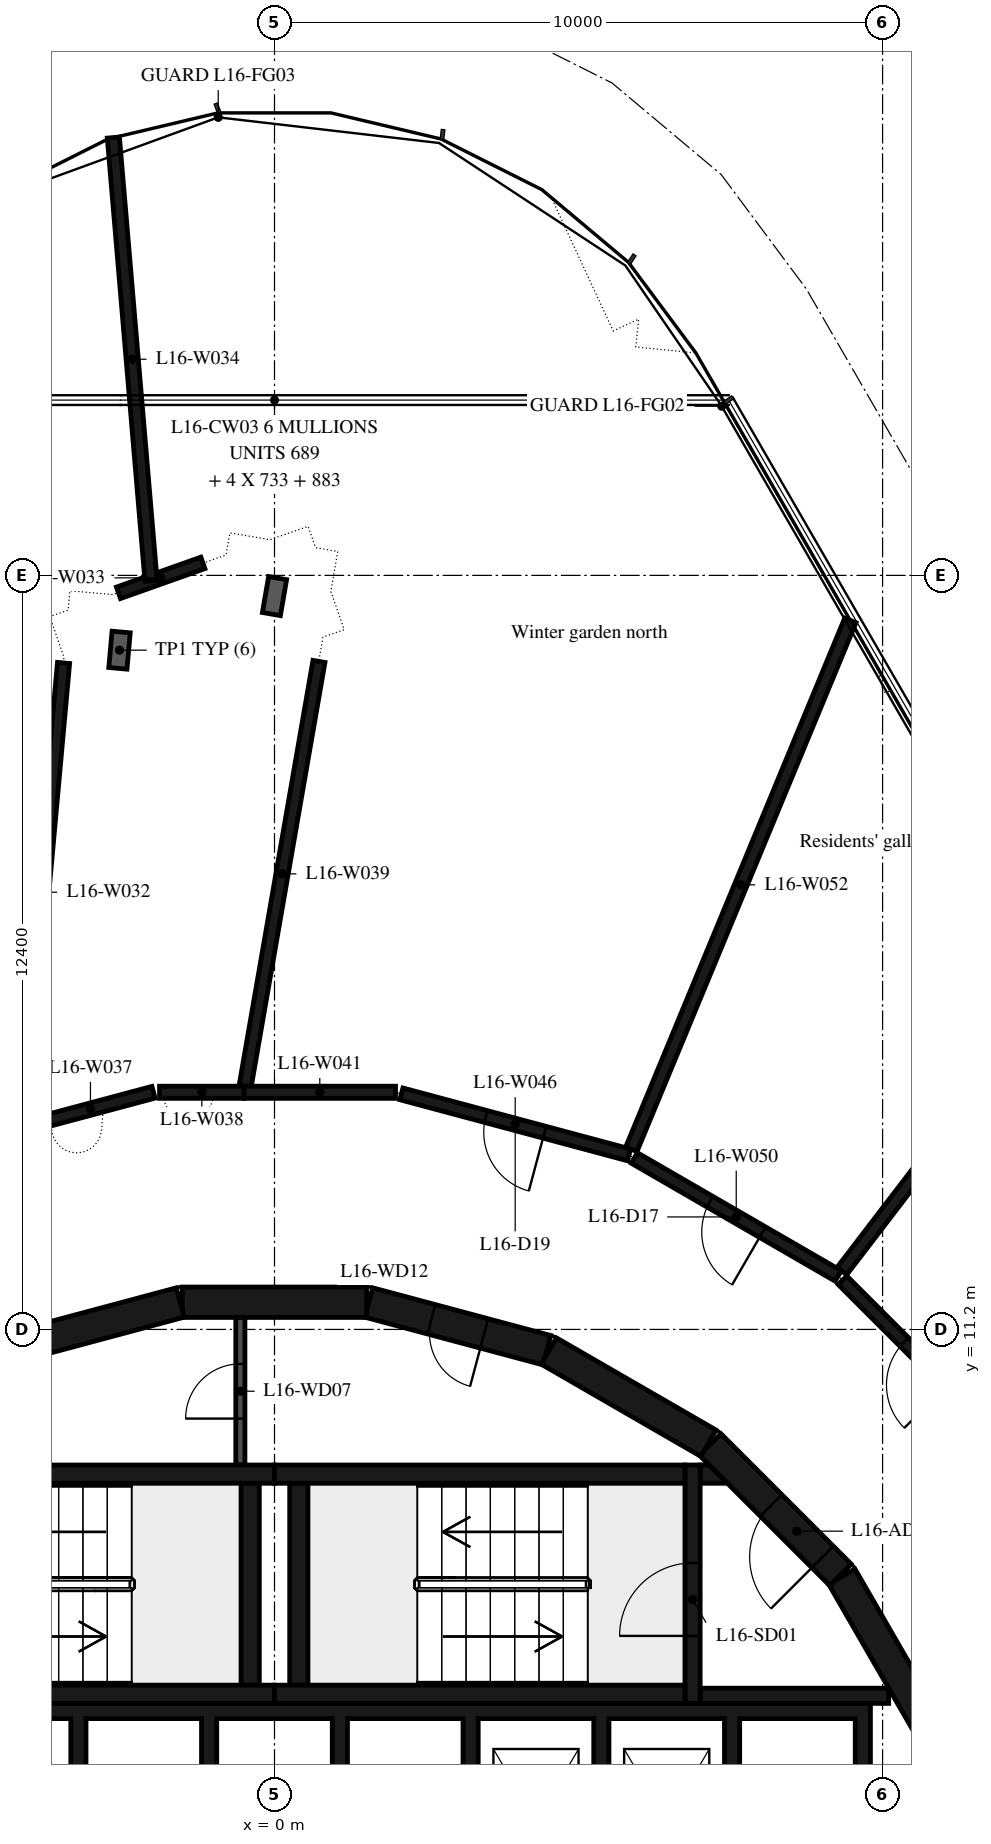
"""IFC4 building model, lengths in metres.
Left out: names, types, materials, properties, quantities, classifications, styles, units other than length and angle.
Written with IfcOpenShell. Run it as: python <this file> out.ifc"""

import sys

from ifc_helpers import new_model, si_unit, direction, frame, frame_2d, origin, place, context, subcontext, project, spatial, polyline, rectangle, outline, extrude, element, fill, save


model = new_model("IFC4")
c1 = context("Model", 3, precision=1e-05, world=origin(), true_north=direction((0.0, 1.0)))
c2 = subcontext(c1, "Body", "Model", "MODEL_VIEW")
j1 = project(units=[si_unit("LENGTHUNIT", "METRE"), si_unit("PLANEANGLEUNIT", "RADIAN")], contexts=[c1])
p1 = place(None, origin())
s1 = spatial("IfcSite", under=j1, at=p1, CompositionType="ELEMENT")
p2 = place(p1, origin())
s2 = spatial("IfcBuilding", under=s1, at=p2, CompositionType="ELEMENT")
p3 = place(p2, frame((0.0, 0.0, 69.9)))
s3 = spatial("IfcBuildingStorey", under=s2, at=p3, CompositionType="ELEMENT", Elevation=69.9)
p4 = place(p3, frame((10.845, 4.51, 0.0), z_axis=(0.0, 0.0, 1.0), x_axis=(-0.500087131594, 0.865975092491, 0.0)))
e1 = element("IfcWall", 1, at=p4, inside=s3, PredefinedType="SHEAR", context=c2, shape_type="SweptSolid", body=[
    extrude(rectangle(XDim=3.033, YDim=0.5, at=frame_2d((1.516, 0.0))), origin(), (0.0, 0.0, 1.0), 6.35),
])
p5 = place(p3, frame((9.308, 7.164, 0.0), z_axis=(0.0, 0.0, 1.0), x_axis=(-0.707106781187, 0.707106781187, 0.0)))
e2 = element("IfcWall", 2, at=p5, inside=s3, PredefinedType="SHEAR", context=c2, shape_type="SweptSolid", body=[
    extrude(rectangle(XDim=3.032, YDim=0.5, at=frame_2d((1.516, 0.0))), origin(), (0.0, 0.0, 1.0), 6.35),
])
p6 = place(p5, frame((0.416, 0.0, 0.0)))
e3 = element("IfcOpeningElement", 3, at=p6, cuts=e2, PredefinedType="OPENING", context=c2, shape_type="SweptSolid", body=[
    extrude(rectangle(XDim=1.2, YDim=2.1, at=frame_2d((0.6, 1.05))), frame((0.0, 0.26, 0.0), z_axis=(0.0, -1.0, 0.0), x_axis=(1.0, 0.0, 0.0)), (0.0, 0.0, 1.0), 0.52),
])
p7 = place(p3, frame((7.137, 9.329, 0.0), z_axis=(0.0, 0.0, 1.0), x_axis=(-0.865975092491, 0.500087131594, 0.0)))
e4 = element("IfcWall", 4, at=p7, inside=s3, PredefinedType="SHEAR", context=c2, shape_type="SweptSolid", body=[
    extrude(rectangle(XDim=3.033, YDim=0.5, at=frame_2d((1.516, 0.0))), origin(), (0.0, 0.0, 1.0), 6.35),
])
p8 = place(p3, frame((4.479, 10.858, 0.0), z_axis=(0.0, 0.0, 1.0), x_axis=(-0.965948410781, 0.258734743916, 0.0)))
e5 = element("IfcWall", 5, at=p8, inside=s3, PredefinedType="SHEAR", context=c2, shape_type="SweptSolid", body=[
    extrude(rectangle(XDim=3.033, YDim=0.5, at=frame_2d((1.516, 0.0))), origin(), (0.0, 0.0, 1.0), 6.35),
])
p9 = place(p8, frame((1.066, 0.0, 0.0)))
e6 = element("IfcOpeningElement", 6, at=p9, cuts=e5, PredefinedType="OPENING", context=c2, shape_type="SweptSolid", body=[
    extrude(rectangle(XDim=0.9, YDim=2.1, at=frame_2d((0.45, 1.05))), frame((0.0, 0.26, 0.0), z_axis=(0.0, -1.0, 0.0), x_axis=(1.0, 0.0, 0.0)), (0.0, 0.0, 1.0), 0.52),
])
for number, where, z_axis, x_axis in (
    (7, (1.516, 11.647, 0.0), (0.0, 0.0, 1.0), (-1.0, 0.0, 0.0)),
    (8, (-1.55, 11.643, 0.0), (0.0, 0.0, 1.0), (-0.966, -0.259, 0.0)),
):
    element("IfcWall", number, at=place(p3, frame(where, z_axis=z_axis, x_axis=x_axis)), inside=s3, PredefinedType="SHEAR", context=c2, shape_type="SweptSolid", body=[
        extrude(rectangle(XDim=3.033, YDim=0.5, at=frame_2d((1.516, 0.0))), origin(), (0.0, 0.0, 1.0), 6.35),
    ])
for number, where, z_axis, x_axis in (
    (9, (0.0, 5.2, 0.0), (0.0, 0.0, 1.0), (1.0, 0.0, 0.0)),
    (10, (0.0, 8.82, 0.0), (0.0, 0.0, 1.0), (1.0, 0.0, 0.0)),
):
    element("IfcWall", number, at=place(p3, frame(where, z_axis=z_axis, x_axis=x_axis)), inside=s3, PredefinedType="SHEAR", context=c2, shape_type="SweptSolid", body=[
        extrude(rectangle(XDim=6.75, YDim=0.3, at=frame_2d((3.375, 0.0))), origin(), (0.0, 0.0, 1.0), 6.35),
    ])
p10 = place(p3, frame((0.4, 5.35, 0.0), z_axis=(0.0, 0.0, 1.0), x_axis=(0.0, 1.0, 0.0)))
e11 = element("IfcWall", 11, at=p10, inside=s3, PredefinedType="SHEAR", context=c2, shape_type="SweptSolid", body=[
    extrude(rectangle(XDim=3.32, YDim=0.3, at=frame_2d((1.66, 0.0))), origin(), (0.0, 0.0, 1.0), 6.35),
])
p11 = place(p3, frame((6.875, 5.05, 0.0), z_axis=(0.0, 0.0, 1.0), x_axis=(0.0, 1.0, 0.0)))
e12 = element("IfcWall", 12, at=p11, inside=s3, PredefinedType="SHEAR", context=c2, shape_type="SweptSolid", body=[
    extrude(rectangle(XDim=3.92, YDim=0.25, at=frame_2d((1.96, 0.0))), origin(), (0.0, 0.0, 1.0), 6.35),
])
p12 = place(p11, frame((1.11, 0.0, 0.0)))
e13 = element("IfcOpeningElement", 13, at=p12, cuts=e12, PredefinedType="OPENING", context=c2, shape_type="SweptSolid", body=[
    extrude(rectangle(XDim=1.2, YDim=2.1, at=frame_2d((0.6, 1.05))), frame((0.0, 0.135, 0.0), z_axis=(0.0, -1.0, 0.0), x_axis=(1.0, 0.0, 0.0)), (0.0, 0.0, 1.0), 0.27),
])
p13 = place(p3, frame((7.0, 5.175, 0.0), z_axis=(0.0, 0.0, 1.0), x_axis=(1.0, 0.0, 0.0)))
e14 = element("IfcWall", 14, at=p13, inside=s3, PredefinedType="SHEAR", context=c2, shape_type="SweptSolid", body=[
    extrude(rectangle(XDim=3.1, YDim=0.25, at=frame_2d((1.55, 0.0))), origin(), (0.0, 0.0, 1.0), 6.35),
])
p14 = place(p3, origin())
e15 = element("IfcWall", 15, at=p14, inside=s3, PredefinedType="SHEAR", context=c2, shape_type="SweptSolid", body=[
    extrude(outline(polyline([(7.448, 8.67), (7.0, 8.67), (7.0, 8.97), (7.148, 8.97), (7.448, 8.67)])), origin(), (0.0, 0.0, 1.0), 6.35),
])
for number, where, z_axis, x_axis in (
    (16, (-6.75, 5.2, 0.0), (0.0, 0.0, 1.0), (1.0, 0.0, 0.0)),
    (17, (-6.75, 8.82, 0.0), (0.0, 0.0, 1.0), (1.0, 0.0, 0.0)),
):
    element("IfcWall", number, at=place(p3, frame(where, z_axis=z_axis, x_axis=x_axis)), inside=s3, PredefinedType="SHEAR", context=c2, shape_type="SweptSolid", body=[
        extrude(rectangle(XDim=6.75, YDim=0.3, at=frame_2d((3.375, 0.0))), origin(), (0.0, 0.0, 1.0), 6.35),
    ])
p15 = place(p3, frame((-0.4, 5.35, 0.0), z_axis=(0.0, 0.0, 1.0), x_axis=(0.0, 1.0, 0.0)))
e18 = element("IfcWall", 18, at=p15, inside=s3, PredefinedType="SHEAR", context=c2, shape_type="SweptSolid", body=[
    extrude(rectangle(XDim=3.32, YDim=0.3, at=frame_2d((1.66, 0.0))), origin(), (0.0, 0.0, 1.0), 6.35),
])
p16 = place(p3, origin())
e19 = element("IfcWall", 19, at=p16, inside=s3, PredefinedType="SHEAR", context=c2, shape_type="SweptSolid", body=[
    extrude(outline(polyline([(-9.55, 4.8), (-7.65, 4.8), (-7.65, 1.9), (-7.4, 1.9), (-7.4, 4.8), (-5.5, 4.8), (-5.5, 1.9), (-5.25, 1.9), (-5.25, 4.8), (-3.35, 4.8), (-3.35, 1.9), (-3.1, 1.9), (-3.1, 4.8), (-1.2, 4.8), (-1.2, 1.9), (-0.95, 1.9), (-0.95, 4.8), (0.95, 4.8), (0.95, 1.9), (1.2, 1.9), (1.2, 4.8), (3.1, 4.8), (3.1, 1.9), (3.35, 1.9), (3.35, 4.8), (5.25, 4.8), (5.25, 1.9), (5.5, 1.9), (5.5, 4.8), (7.4, 4.8), (7.4, 1.9), (7.65, 1.9), (7.65, 4.8), (9.55, 4.8), (9.55, 1.9), (9.8, 1.9), (9.8, 4.8), (9.8, 5.05), (-9.8, 5.05), (-9.8, 4.8), (-9.8, 1.9), (-9.55, 1.9), (-9.55, 4.8)])), origin(), (0.0, 0.0, 1.0), 6.35),
])
p17 = place(p3, frame((-0.562, 8.97, 0.0), z_axis=(0.0, 0.0, 1.0), x_axis=(0.0, 1.0, 0.0)))
e20 = element("IfcWall", 20, at=p17, inside=s3, PredefinedType="PARTITIONING", context=c2, shape_type="SweptSolid", body=[
    extrude(rectangle(XDim=2.427, YDim=0.15, at=frame_2d((1.214, 0.0))), origin(), (0.0, 0.0, 1.0), 6.35),
])
p18 = place(p17, frame((0.764, 0.0, 0.0)))
e21 = element("IfcOpeningElement", 21, at=p18, cuts=e20, PredefinedType="OPENING", context=c2, shape_type="SweptSolid", body=[
    extrude(rectangle(XDim=0.9, YDim=2.1, at=frame_2d((0.45, 1.05))), frame((0.0, 0.085, 0.0), z_axis=(0.0, -1.0, 0.0), x_axis=(1.0, 0.0, 0.0)), (0.0, 0.0, 1.0), 0.17),
])
p19 = place(p3, frame((-3.469, 22.16, 0.0), z_axis=(0.0, 0.0, 1.0), x_axis=(-0.090058939674, -0.995936437422, 0.0)))
e22 = element("IfcWall", 22, at=p19, inside=s3, PredefinedType="PARTITIONING", context=c2, shape_type="SweptSolid", body=[
    extrude(rectangle(XDim=7.572, YDim=0.2, at=frame_2d((3.786, 0.0))), origin(), (0.0, 0.0, 1.0), 6.35),
])
p20 = place(p3, frame((-2.566, 23.313, 0.0), z_axis=(0.0, 0.0, 1.0), x_axis=(0.942422688544, 0.334424096199, 0.0)))
e23 = element("IfcWall", 23, at=p20, inside=s3, PredefinedType="PARTITIONING", context=c2, shape_type="SweptSolid", body=[
    extrude(rectangle(XDim=1.472, YDim=0.2, at=frame_2d((0.736, 0.0))), origin(), (0.0, 0.0, 1.0), 6.35),
])
p21 = place(p3, frame((-2.03, 23.51, 0.0), z_axis=(0.0, 0.0, 1.0), x_axis=(-0.084724408258, 0.996404423236, 0.0)))
e24 = element("IfcWall", 24, at=p21, inside=s3, PredefinedType="PARTITIONING", context=c2, shape_type="SweptSolid", body=[
    extrude(rectangle(XDim=7.316, YDim=0.2, at=frame_2d((3.658, 0.0))), origin(), (0.0, 0.0, 1.0), 6.35),
])
p22 = place(p3, frame((-1.99, 15.1, 0.0), z_axis=(0.0, 0.0, 1.0), x_axis=(-0.966087519043, -0.258214843781, 0.0)))
e25 = element("IfcWall", 25, at=p22, inside=s3, PredefinedType="PARTITIONING", context=c2, shape_type="SweptSolid", body=[
    extrude(rectangle(XDim=2.146, YDim=0.2, at=frame_2d((1.073, 0.0))), origin(), (0.0, 0.0, 1.0), 6.35),
])
p23 = place(p3, frame((-0.5, 15.1, 0.0), z_axis=(0.0, 0.0, 1.0), x_axis=(-1.0, 0.0, 0.0)))
e26 = element("IfcWall", 26, at=p23, inside=s3, PredefinedType="PARTITIONING", context=c2, shape_type="SweptSolid", body=[
    extrude(rectangle(XDim=1.39, YDim=0.2, at=frame_2d((0.695, 0.0))), origin(), (0.0, 0.0, 1.0), 6.35),
])
p24 = place(p3, frame((-0.483, 15.198, 0.0), z_axis=(0.0, 0.0, 1.0), x_axis=(0.171227856746, 0.985231455585, 0.0)))
e27 = element("IfcWall", 27, at=p24, inside=s3, PredefinedType="PARTITIONING", context=c2, shape_type="SweptSolid", body=[
    extrude(rectangle(XDim=7.092, YDim=0.2, at=frame_2d((3.546, 0.0))), origin(), (0.0, 0.0, 1.0), 6.35),
])
p25 = place(p3, frame((1.99, 15.1, 0.0), z_axis=(0.0, 0.0, 1.0), x_axis=(-1.0, 0.0, 0.0)))
e28 = element("IfcWall", 28, at=p25, inside=s3, PredefinedType="PARTITIONING", context=c2, shape_type="SweptSolid", body=[
    extrude(rectangle(XDim=2.49, YDim=0.2, at=frame_2d((1.245, 0.0))), origin(), (0.0, 0.0, 1.0), 6.35),
])
p26 = place(p3, frame((5.83, 14.07, 0.0), z_axis=(0.0, 0.0, 1.0), x_axis=(-0.965870133458, 0.259026804199, 0.0)))
e29 = element("IfcWall", 29, at=p26, inside=s3, PredefinedType="PARTITIONING", context=c2, shape_type="SweptSolid", body=[
    extrude(rectangle(XDim=3.876, YDim=0.2, at=frame_2d((1.938, 0.0))), origin(), (0.0, 0.0, 1.0), 6.35),
])
p27 = place(p26, frame((1.438, 0.0, 0.0)))
e30 = element("IfcOpeningElement", 30, at=p27, cuts=e29, PredefinedType="OPENING", context=c2, shape_type="SweptSolid", body=[
    extrude(rectangle(XDim=1.0, YDim=2.1, at=frame_2d((0.5, 1.05))), frame((0.0, 0.11, 0.0), z_axis=(0.0, -1.0, 0.0), x_axis=(1.0, 0.0, 0.0)), (0.0, 0.0, 1.0), 0.22),
])
p28 = place(p3, frame((9.27, 12.08, 0.0), z_axis=(0.0, 0.0, 1.0), x_axis=(-0.865601686425, 0.500733182901, 0.0)))
e31 = element("IfcWall", 31, at=p28, inside=s3, PredefinedType="PARTITIONING", context=c2, shape_type="SweptSolid", body=[
    extrude(rectangle(XDim=3.874, YDim=0.2, at=frame_2d((1.937, 0.0))), origin(), (0.0, 0.0, 1.0), 6.35),
])
p29 = place(p28, frame((1.437, 0.0, 0.0)))
e32 = element("IfcOpeningElement", 32, at=p29, cuts=e31, PredefinedType="OPENING", context=c2, shape_type="SweptSolid", body=[
    extrude(rectangle(XDim=1.0, YDim=2.1, at=frame_2d((0.5, 1.05))), frame((0.0, 0.11, 0.0), z_axis=(0.0, -1.0, 0.0), x_axis=(1.0, 0.0, 0.0)), (0.0, 0.0, 1.0), 0.22),
])
p30 = place(p3, frame((9.331, 12.159, 0.0), z_axis=(0.0, 0.0, 1.0), x_axis=(0.607927563865, 0.793992491837, 0.0)))
e33 = element("IfcWall", 33, at=p30, inside=s3, PredefinedType="PARTITIONING", context=c2, shape_type="SweptSolid", body=[
    extrude(rectangle(XDim=5.92, YDim=0.2, at=frame_2d((2.96, 0.0))), origin(), (0.0, 0.0, 1.0), 6.35),
])
p31 = place(p3, frame((9.47, 22.86, 0.0), z_axis=(0.0, 0.0, 1.0), x_axis=(-0.382599926304, -0.923914117433, 0.0)))
e34 = element("IfcWall", 34, at=p31, inside=s3, PredefinedType="PARTITIONING", context=c2, shape_type="SweptSolid", body=[
    extrude(rectangle(XDim=9.414, YDim=0.2, at=frame_2d((4.707, 0.0))), origin(), (0.0, 0.0, 1.0), 6.35),
])
p32 = place(p3, frame((12.08, 9.27, 0.0), z_axis=(0.0, 0.0, 1.0), x_axis=(-0.707106781187, 0.707106781187, 0.0)))
e35 = element("IfcWall", 35, at=p32, inside=s3, PredefinedType="PARTITIONING", context=c2, shape_type="SweptSolid", body=[
    extrude(rectangle(XDim=3.874, YDim=0.2, at=frame_2d((1.937, 0.0))), origin(), (0.0, 0.0, 1.0), 6.35),
])
p33 = place(p32, frame((1.437, 0.0, 0.0)))
e36 = element("IfcOpeningElement", 36, at=p33, cuts=e35, PredefinedType="OPENING", context=c2, shape_type="SweptSolid", body=[
    extrude(rectangle(XDim=1.0, YDim=2.1, at=frame_2d((0.5, 1.05))), frame((0.0, 0.11, 0.0), z_axis=(0.0, -1.0, 0.0), x_axis=(1.0, 0.0, 0.0)), (0.0, 0.0, 1.0), 0.22),
])
p34 = place(p12, origin())
e37 = element("IfcDoor", 37, at=p34, inside=s3, OperationType="SINGLE_SWING_LEFT", PredefinedType="DOOR", context=c2, shape_type="SweptSolid", body=[
    extrude(rectangle(XDim=1.2, YDim=2.1, at=frame_2d((0.6, 1.05))), frame((0.0, 0.025, 0.0), z_axis=(0.0, -1.0, 0.0), x_axis=(1.0, 0.0, 0.0)), (0.0, 0.0, 1.0), 0.05),
])
fill(e13, e37)
p35 = place(p6, origin())
e38 = element("IfcDoor", 38, at=p35, inside=s3, OperationType="SINGLE_SWING_RIGHT", PredefinedType="DOOR", context=c2, shape_type="SweptSolid", body=[
    extrude(rectangle(XDim=1.2, YDim=2.1, at=frame_2d((0.6, 1.05))), frame((0.0, 0.025, 0.0), z_axis=(0.0, -1.0, 0.0), x_axis=(1.0, 0.0, 0.0)), (0.0, 0.0, 1.0), 0.05),
])
fill(e3, e38)
p36 = place(p18, origin())
e39 = element("IfcDoor", 39, at=p36, inside=s3, OperationType="SINGLE_SWING_RIGHT", PredefinedType="DOOR", context=c2, shape_type="SweptSolid", body=[
    extrude(rectangle(XDim=0.9, YDim=2.1, at=frame_2d((0.45, 1.05))), frame((0.0, 0.025, 0.0), z_axis=(0.0, -1.0, 0.0), x_axis=(1.0, 0.0, 0.0)), (0.0, 0.0, 1.0), 0.05),
])
fill(e21, e39)
p37 = place(p9, origin())
e40 = element("IfcDoor", 40, at=p37, inside=s3, OperationType="SINGLE_SWING_LEFT", PredefinedType="DOOR", context=c2, shape_type="SweptSolid", body=[
    extrude(rectangle(XDim=0.9, YDim=2.1, at=frame_2d((0.45, 1.05))), frame((0.0, 0.025, 0.0), z_axis=(0.0, -1.0, 0.0), x_axis=(1.0, 0.0, 0.0)), (0.0, 0.0, 1.0), 0.05),
])
fill(e6, e40)
p38 = place(p33, origin())
e41 = element("IfcDoor", 41, at=p38, inside=s3, OperationType="SINGLE_SWING_LEFT", PredefinedType="DOOR", context=c2, shape_type="SweptSolid", body=[
    extrude(rectangle(XDim=1.0, YDim=2.1, at=frame_2d((0.5, 1.05))), frame((0.0, 0.025, 0.0), z_axis=(0.0, -1.0, 0.0), x_axis=(1.0, 0.0, 0.0)), (0.0, 0.0, 1.0), 0.05),
])
fill(e36, e41)
p39 = place(p29, origin())
e42 = element("IfcDoor", 42, at=p39, inside=s3, OperationType="SINGLE_SWING_LEFT", PredefinedType="DOOR", context=c2, shape_type="SweptSolid", body=[
    extrude(rectangle(XDim=1.0, YDim=2.1, at=frame_2d((0.5, 1.05))), frame((0.0, 0.025, 0.0), z_axis=(0.0, -1.0, 0.0), x_axis=(1.0, 0.0, 0.0)), (0.0, 0.0, 1.0), 0.05),
])
fill(e32, e42)
p40 = place(p27, origin())
e43 = element("IfcDoor", 43, at=p40, inside=s3, OperationType="SINGLE_SWING_LEFT", PredefinedType="DOOR", context=c2, shape_type="SweptSolid", body=[
    extrude(rectangle(XDim=1.0, YDim=2.1, at=frame_2d((0.5, 1.05))), frame((0.0, 0.025, 0.0), z_axis=(0.0, -1.0, 0.0), x_axis=(1.0, 0.0, 0.0)), (0.0, 0.0, 1.0), 0.05),
])
fill(e30, e43)
save(model, sys.argv[1])
